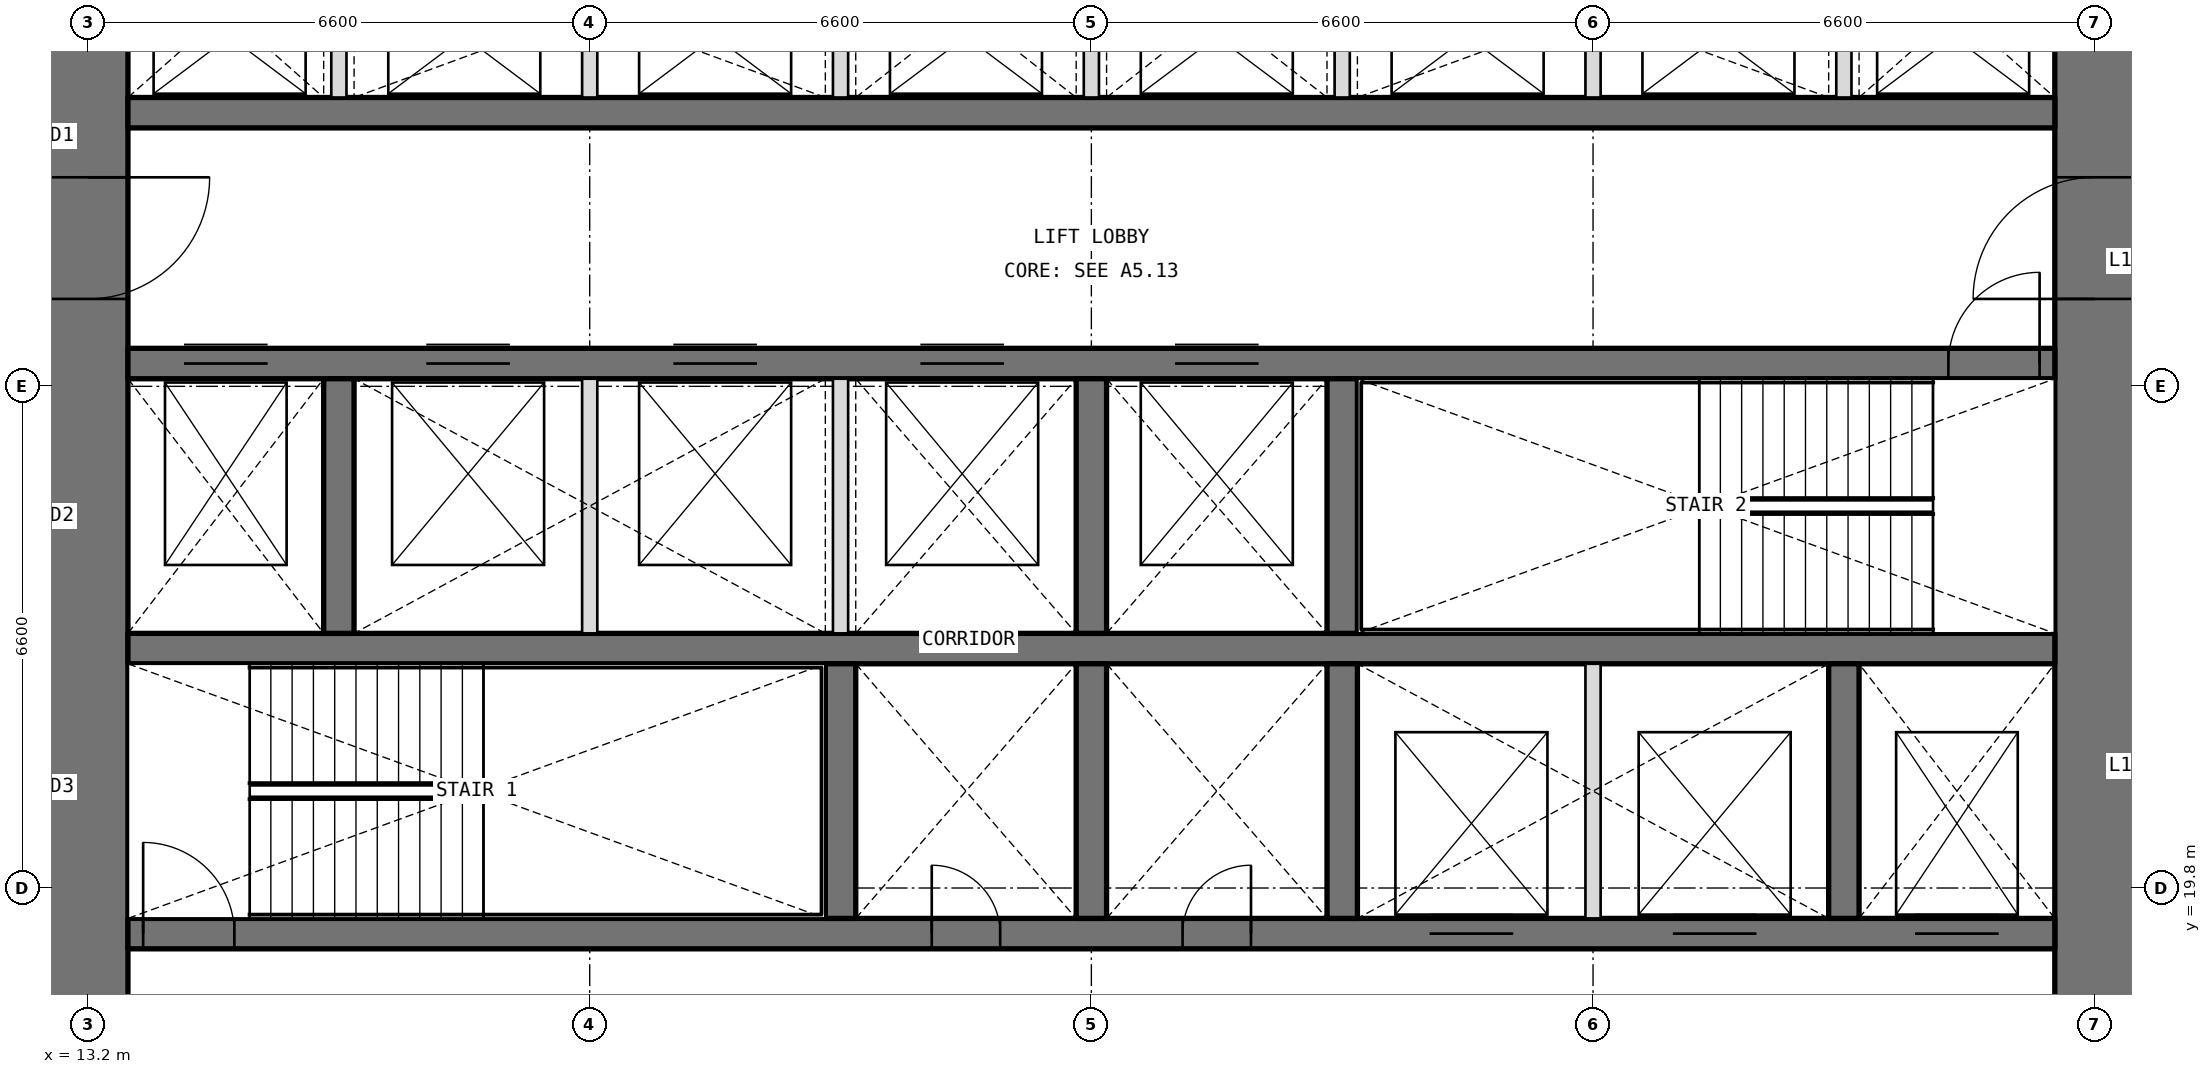
"""IFC4 building model, lengths in metres.
Left out: names, types, materials, properties, quantities, classifications, styles, units other than length and angle.
Written with IfcOpenShell. Run it as: python <this file> out.ifc"""

import sys

from ifc_helpers import new_model, si_unit, direction, frame, frame_2d, origin, place, context, subcontext, project, spatial, rectangle, extrude, element, fill, save


model = new_model("IFC4")
c1 = context("Model", 3, precision=1e-05, world=origin(), true_north=direction((0.0, 1.0)))
c2 = subcontext(c1, "Body", "Model", "MODEL_VIEW")
j1 = project(units=[si_unit("LENGTHUNIT", "METRE"), si_unit("PLANEANGLEUNIT", "RADIAN")], contexts=[c1])
p1 = place(None, origin())
s1 = spatial("IfcSite", under=j1, at=p1, CompositionType="ELEMENT")
p2 = place(p1, origin())
s2 = spatial("IfcBuilding", under=s1, at=p2, CompositionType="ELEMENT")
p3 = place(p2, frame((0.0, 0.0, 50.7)))
s3 = spatial("IfcBuildingStorey", under=s2, at=p3, CompositionType="ELEMENT", Elevation=50.7)
p4 = place(p3, frame((39.6, 13.725, 0.0), z_axis=(0.0, 0.0, 1.0), x_axis=(0.0, 1.0, 0.0)))
e1 = element("IfcWall", 1, at=p4, inside=s3, PredefinedType="SHEAR", context=c2, shape_type="SweptSolid", body=[
    extrude(rectangle(XDim=18.75, YDim=1.05, at=frame_2d((9.375, 0.0))), origin(), (0.0, 0.0, 1.0), 4.2),
])
p5 = place(p4, frame((3.025, 0.0, 0.0)))
e2 = element("IfcOpeningElement", 2, at=p5, cuts=e1, PredefinedType="OPENING", context=c2, shape_type="SweptSolid", body=[
    extrude(rectangle(XDim=1.6, YDim=2.1, at=frame_2d((0.8, 1.05))), frame((0.0, 0.535, 0.0), z_axis=(0.0, -1.0, 0.0), x_axis=(1.0, 0.0, 0.0)), (0.0, 0.0, 1.0), 1.07),
])
p6 = place(p4, frame((13.825, 0.0, 0.0)))
e3 = element("IfcOpeningElement", 3, at=p6, cuts=e1, PredefinedType="OPENING", context=c2, shape_type="SweptSolid", body=[
    extrude(rectangle(XDim=1.6, YDim=2.1, at=frame_2d((0.8, 1.05))), frame((0.0, 0.535, 0.0), z_axis=(0.0, -1.0, 0.0), x_axis=(1.0, 0.0, 0.0)), (0.0, 0.0, 1.0), 1.07),
])
p7 = place(p3, frame((13.2, 32.475, 0.0), z_axis=(0.0, 0.0, 1.0), x_axis=(0.0, -1.0, 0.0)))
e4 = element("IfcWall", 4, at=p7, inside=s3, PredefinedType="SHEAR", context=c2, shape_type="SweptSolid", body=[
    extrude(rectangle(XDim=18.75, YDim=1.05, at=frame_2d((9.375, 0.0))), origin(), (0.0, 0.0, 1.0), 4.2),
])
p8 = place(p7, frame((14.125, 0.0, 0.0)))
e5 = element("IfcOpeningElement", 5, at=p8, cuts=e4, PredefinedType="OPENING", context=c2, shape_type="SweptSolid", body=[
    extrude(rectangle(XDim=1.6, YDim=2.1, at=frame_2d((0.8, 1.05))), frame((0.0, 0.535, 0.0), z_axis=(0.0, -1.0, 0.0), x_axis=(1.0, 0.0, 0.0)), (0.0, 0.0, 1.0), 1.07),
])
p9 = place(p7, frame((3.325, 0.0, 0.0)))
e6 = element("IfcOpeningElement", 6, at=p9, cuts=e4, PredefinedType="OPENING", context=c2, shape_type="SweptSolid", body=[
    extrude(rectangle(XDim=1.6, YDim=2.1, at=frame_2d((0.8, 1.05))), frame((0.0, 0.535, 0.0), z_axis=(0.0, -1.0, 0.0), x_axis=(1.0, 0.0, 0.0)), (0.0, 0.0, 1.0), 1.07),
])
p10 = place(p3, frame((13.725, 19.2, 0.0), z_axis=(0.0, 0.0, 1.0), x_axis=(1.0, 0.0, 0.0)))
e7 = element("IfcWall", 7, at=p10, inside=s3, PredefinedType="SHEAR", context=c2, shape_type="SweptSolid", body=[
    extrude(rectangle(XDim=25.35, YDim=0.4, at=frame_2d((12.675, 0.0))), origin(), (0.0, 0.0, 1.0), 4.2),
])
p11 = place(p10, frame((10.575, 0.0, 0.0)))
e8 = element("IfcOpeningElement", 8, at=p11, cuts=e7, PredefinedType="OPENING", context=c2, shape_type="SweptSolid", body=[
    extrude(rectangle(XDim=0.9, YDim=2.1, at=frame_2d((0.45, 1.05))), frame((0.0, 0.21, 0.0), z_axis=(0.0, -1.0, 0.0), x_axis=(1.0, 0.0, 0.0)), (0.0, 0.0, 1.0), 0.42),
])
p12 = place(p10, frame((13.875, 0.0, 0.0)))
e9 = element("IfcOpeningElement", 9, at=p12, cuts=e7, PredefinedType="OPENING", context=c2, shape_type="SweptSolid", body=[
    extrude(rectangle(XDim=0.9, YDim=2.1, at=frame_2d((0.45, 1.05))), frame((0.0, 0.21, 0.0), z_axis=(0.0, -1.0, 0.0), x_axis=(1.0, 0.0, 0.0)), (0.0, 0.0, 1.0), 0.42),
])
p13 = place(p10, frame((0.2, 0.0, 0.0)))
e10 = element("IfcOpeningElement", 10, at=p13, cuts=e7, PredefinedType="OPENING", context=c2, shape_type="SweptSolid", body=[
    extrude(rectangle(XDim=1.2, YDim=2.1, at=frame_2d((0.6, 1.05))), frame((0.0, 0.21, 0.0), z_axis=(0.0, -1.0, 0.0), x_axis=(1.0, 0.0, 0.0)), (0.0, 0.0, 1.0), 0.42),
])
p14 = place(p10, frame((23.512, 0.0, 0.0)))
e11 = element("IfcOpeningElement", 11, at=p14, cuts=e7, PredefinedType="OPENING", context=c2, shape_type="SweptSolid", body=[
    extrude(rectangle(XDim=1.1, YDim=2.1, at=frame_2d((0.55, 1.05))), frame((0.0, 0.21, 0.0), z_axis=(0.0, -1.0, 0.0), x_axis=(1.0, 0.0, 0.0)), (0.0, 0.0, 1.0), 0.42),
])
p15 = place(p10, frame((17.125, 0.0, 0.0)))
e12 = element("IfcOpeningElement", 12, at=p15, cuts=e7, PredefinedType="OPENING", context=c2, shape_type="SweptSolid", body=[
    extrude(rectangle(XDim=1.1, YDim=2.1, at=frame_2d((0.55, 1.05))), frame((0.0, 0.21, 0.0), z_axis=(0.0, -1.0, 0.0), x_axis=(1.0, 0.0, 0.0)), (0.0, 0.0, 1.0), 0.42),
])
p16 = place(p10, frame((20.325, 0.0, 0.0)))
e13 = element("IfcOpeningElement", 13, at=p16, cuts=e7, PredefinedType="OPENING", context=c2, shape_type="SweptSolid", body=[
    extrude(rectangle(XDim=1.1, YDim=2.1, at=frame_2d((0.55, 1.05))), frame((0.0, 0.21, 0.0), z_axis=(0.0, -1.0, 0.0), x_axis=(1.0, 0.0, 0.0)), (0.0, 0.0, 1.0), 0.42),
])
p17 = place(p3, frame((13.725, 22.95, 0.0), z_axis=(0.0, 0.0, 1.0), x_axis=(1.0, 0.0, 0.0)))
e14 = element("IfcWall", 14, at=p17, inside=s3, PredefinedType="SHEAR", context=c2, shape_type="SweptSolid", body=[
    extrude(rectangle(XDim=25.35, YDim=0.4, at=frame_2d((12.675, 0.0))), origin(), (0.0, 0.0, 1.0), 4.2),
])
p18 = place(p3, frame((13.725, 26.7, 0.0), z_axis=(0.0, 0.0, 1.0), x_axis=(1.0, 0.0, 0.0)))
e15 = element("IfcWall", 15, at=p18, inside=s3, PredefinedType="SHEAR", context=c2, shape_type="SweptSolid", body=[
    extrude(rectangle(XDim=25.35, YDim=0.4, at=frame_2d((12.675, 0.0))), origin(), (0.0, 0.0, 1.0), 4.2),
])
p19 = place(p18, frame((23.95, 0.0, 0.0)))
e16 = element("IfcOpeningElement", 16, at=p19, cuts=e15, PredefinedType="OPENING", context=c2, shape_type="SweptSolid", body=[
    extrude(rectangle(XDim=1.2, YDim=2.1, at=frame_2d((0.6, 1.05))), frame((0.0, 0.21, 0.0), z_axis=(0.0, -1.0, 0.0), x_axis=(1.0, 0.0, 0.0)), (0.0, 0.0, 1.0), 0.42),
])
p20 = place(p18, frame((0.738, 0.0, 0.0)))
e17 = element("IfcOpeningElement", 17, at=p20, cuts=e15, PredefinedType="OPENING", context=c2, shape_type="SweptSolid", body=[
    extrude(rectangle(XDim=1.1, YDim=2.1, at=frame_2d((0.55, 1.05))), frame((0.0, 0.21, 0.0), z_axis=(0.0, -1.0, 0.0), x_axis=(1.0, 0.0, 0.0)), (0.0, 0.0, 1.0), 0.42),
])
p21 = place(p18, frame((3.925, 0.0, 0.0)))
e18 = element("IfcOpeningElement", 18, at=p21, cuts=e15, PredefinedType="OPENING", context=c2, shape_type="SweptSolid", body=[
    extrude(rectangle(XDim=1.1, YDim=2.1, at=frame_2d((0.55, 1.05))), frame((0.0, 0.21, 0.0), z_axis=(0.0, -1.0, 0.0), x_axis=(1.0, 0.0, 0.0)), (0.0, 0.0, 1.0), 0.42),
])
p22 = place(p18, frame((7.175, 0.0, 0.0)))
e19 = element("IfcOpeningElement", 19, at=p22, cuts=e15, PredefinedType="OPENING", context=c2, shape_type="SweptSolid", body=[
    extrude(rectangle(XDim=1.1, YDim=2.1, at=frame_2d((0.55, 1.05))), frame((0.0, 0.21, 0.0), z_axis=(0.0, -1.0, 0.0), x_axis=(1.0, 0.0, 0.0)), (0.0, 0.0, 1.0), 0.42),
])
p23 = place(p18, frame((10.425, 0.0, 0.0)))
e20 = element("IfcOpeningElement", 20, at=p23, cuts=e15, PredefinedType="OPENING", context=c2, shape_type="SweptSolid", body=[
    extrude(rectangle(XDim=1.1, YDim=2.1, at=frame_2d((0.55, 1.05))), frame((0.0, 0.21, 0.0), z_axis=(0.0, -1.0, 0.0), x_axis=(1.0, 0.0, 0.0)), (0.0, 0.0, 1.0), 0.42),
])
p24 = place(p18, frame((13.775, 0.0, 0.0)))
e21 = element("IfcOpeningElement", 21, at=p24, cuts=e15, PredefinedType="OPENING", context=c2, shape_type="SweptSolid", body=[
    extrude(rectangle(XDim=1.1, YDim=2.1, at=frame_2d((0.55, 1.05))), frame((0.0, 0.21, 0.0), z_axis=(0.0, -1.0, 0.0), x_axis=(1.0, 0.0, 0.0)), (0.0, 0.0, 1.0), 0.42),
])
p25 = place(p3, frame((13.725, 30.0, 0.0), z_axis=(0.0, 0.0, 1.0), x_axis=(1.0, 0.0, 0.0)))
e22 = element("IfcWall", 22, at=p25, inside=s3, PredefinedType="SHEAR", context=c2, shape_type="SweptSolid", body=[
    extrude(rectangle(XDim=25.35, YDim=0.4, at=frame_2d((12.675, 0.0))), origin(), (0.0, 0.0, 1.0), 4.2),
])
for number, where, z_axis, x_axis in (
    (23, (23.1, 19.4, 0.0), (0.0, 0.0, 1.0), (0.0, 1.0, 0.0)),
    (24, (26.4, 19.4, 0.0), (0.0, 0.0, 1.0), (0.0, 1.0, 0.0)),
    (25, (29.7, 19.4, 0.0), (0.0, 0.0, 1.0), (0.0, 1.0, 0.0)),
    (26, (36.3, 19.4, 0.0), (0.0, 0.0, 1.0), (0.0, 1.0, 0.0)),
    (27, (16.5, 23.15, 0.0), (0.0, 0.0, 1.0), (0.0, 1.0, 0.0)),
    (28, (26.4, 23.15, 0.0), (0.0, 0.0, 1.0), (0.0, 1.0, 0.0)),
    (29, (29.7, 23.15, 0.0), (0.0, 0.0, 1.0), (0.0, 1.0, 0.0)),
):
    element("IfcWall", number, at=place(p3, frame(where, z_axis=z_axis, x_axis=x_axis)), inside=s3, PredefinedType="SHEAR", context=c2, shape_type="SweptSolid", body=[
        extrude(rectangle(XDim=3.35, YDim=0.4, at=frame_2d((1.675, 0.0))), origin(), (0.0, 0.0, 1.0), 4.2),
    ])
for number, where, z_axis, x_axis in (
    (30, (16.5, 30.2, 0.0), (0.0, 0.0, 1.0), (0.0, 1.0, 0.0)),
    (31, (19.8, 30.2, 0.0), (0.0, 0.0, 1.0), (0.0, 1.0, 0.0)),
    (32, (23.1, 30.2, 0.0), (0.0, 0.0, 1.0), (0.0, 1.0, 0.0)),
    (33, (26.4, 30.2, 0.0), (0.0, 0.0, 1.0), (0.0, 1.0, 0.0)),
    (34, (29.7, 30.2, 0.0), (0.0, 0.0, 1.0), (0.0, 1.0, 0.0)),
    (35, (33.0, 30.2, 0.0), (0.0, 0.0, 1.0), (0.0, 1.0, 0.0)),
    (36, (36.3, 30.2, 0.0), (0.0, 0.0, 1.0), (0.0, 1.0, 0.0)),
):
    element("IfcWall", number, at=place(p3, frame(where, z_axis=z_axis, x_axis=x_axis)), inside=s3, PredefinedType="PARTITIONING", context=c2, shape_type="SweptSolid", body=[
        extrude(rectangle(XDim=2.275, YDim=0.2, at=frame_2d((1.138, 0.0))), origin(), (0.0, 0.0, 1.0), 4.2),
    ])
for number, where, z_axis, x_axis in (
    (37, (33.0, 19.4, 0.0), (0.0, 0.0, 1.0), (0.0, 1.0, 0.0)),
    (38, (19.8, 23.15, 0.0), (0.0, 0.0, 1.0), (0.0, 1.0, 0.0)),
    (39, (23.1, 23.15, 0.0), (0.0, 0.0, 1.0), (0.0, 1.0, 0.0)),
):
    element("IfcWall", number, at=place(p3, frame(where, z_axis=z_axis, x_axis=x_axis)), inside=s3, PredefinedType="PARTITIONING", context=c2, shape_type="SweptSolid", body=[
        extrude(rectangle(XDim=3.35, YDim=0.2, at=frame_2d((1.675, 0.0))), origin(), (0.0, 0.0, 1.0), 4.2),
    ])
p26 = place(p11, origin())
e40 = element("IfcDoor", 40, at=p26, inside=s3, OperationType="SINGLE_SWING_LEFT", PredefinedType="DOOR", context=c2, shape_type="SweptSolid", body=[
    extrude(rectangle(XDim=0.9, YDim=2.1, at=frame_2d((0.45, 1.05))), frame((0.0, 0.025, 0.0), z_axis=(0.0, -1.0, 0.0), x_axis=(1.0, 0.0, 0.0)), (0.0, 0.0, 1.0), 0.05),
])
fill(e8, e40)
p27 = place(p12, origin())
e41 = element("IfcDoor", 41, at=p27, inside=s3, OperationType="SINGLE_SWING_RIGHT", PredefinedType="DOOR", context=c2, shape_type="SweptSolid", body=[
    extrude(rectangle(XDim=0.9, YDim=2.1, at=frame_2d((0.45, 1.05))), frame((0.0, 0.025, 0.0), z_axis=(0.0, -1.0, 0.0), x_axis=(1.0, 0.0, 0.0)), (0.0, 0.0, 1.0), 0.05),
])
fill(e9, e41)
p28 = place(p13, origin())
e42 = element("IfcDoor", 42, at=p28, inside=s3, OperationType="SINGLE_SWING_LEFT", PredefinedType="DOOR", context=c2, shape_type="SweptSolid", body=[
    extrude(rectangle(XDim=1.2, YDim=2.1, at=frame_2d((0.6, 1.05))), frame((0.0, 0.025, 0.0), z_axis=(0.0, -1.0, 0.0), x_axis=(1.0, 0.0, 0.0)), (0.0, 0.0, 1.0), 0.05),
])
fill(e10, e42)
p29 = place(p19, origin())
e43 = element("IfcDoor", 43, at=p29, inside=s3, OperationType="SINGLE_SWING_RIGHT", PredefinedType="DOOR", context=c2, shape_type="SweptSolid", body=[
    extrude(rectangle(XDim=1.2, YDim=2.1, at=frame_2d((0.6, 1.05))), frame((0.0, 0.025, 0.0), z_axis=(0.0, -1.0, 0.0), x_axis=(1.0, 0.0, 0.0)), (0.0, 0.0, 1.0), 0.05),
])
fill(e16, e43)
p30 = place(p9, origin())
e44 = element("IfcDoor", 44, at=p30, inside=s3, OperationType="DOUBLE_DOOR_DOUBLE_SWING", PredefinedType="DOOR", context=c2, shape_type="SweptSolid", body=[
    extrude(rectangle(XDim=1.6, YDim=2.1, at=frame_2d((0.8, 1.05))), frame((0.0, 0.025, 0.0), z_axis=(0.0, -1.0, 0.0), x_axis=(1.0, 0.0, 0.0)), (0.0, 0.0, 1.0), 0.05),
])
fill(e6, e44)
p31 = place(p6, origin())
e45 = element("IfcDoor", 45, at=p31, inside=s3, OperationType="DOUBLE_DOOR_DOUBLE_SWING", PredefinedType="DOOR", context=c2, shape_type="SweptSolid", body=[
    extrude(rectangle(XDim=1.6, YDim=2.1, at=frame_2d((0.8, 1.05))), frame((0.0, 0.025, 0.0), z_axis=(0.0, -1.0, 0.0), x_axis=(1.0, 0.0, 0.0)), (0.0, 0.0, 1.0), 0.05),
])
fill(e3, e45)
p32 = place(p20, origin())
e46 = element("IfcDoor", 46, at=p32, inside=s3, OperationType="DOUBLE_DOOR_SLIDING", PredefinedType="DOOR", context=c2, shape_type="SweptSolid", body=[
    extrude(rectangle(XDim=1.1, YDim=2.1, at=frame_2d((0.55, 1.05))), frame((0.0, 0.025, 0.0), z_axis=(0.0, -1.0, 0.0), x_axis=(1.0, 0.0, 0.0)), (0.0, 0.0, 1.0), 0.05),
])
fill(e17, e46)
p33 = place(p14, origin())
e47 = element("IfcDoor", 47, at=p33, inside=s3, OperationType="DOUBLE_DOOR_SLIDING", PredefinedType="DOOR", context=c2, shape_type="SweptSolid", body=[
    extrude(rectangle(XDim=1.1, YDim=2.1, at=frame_2d((0.55, 1.05))), frame((0.0, 0.025, 0.0), z_axis=(0.0, -1.0, 0.0), x_axis=(1.0, 0.0, 0.0)), (0.0, 0.0, 1.0), 0.05),
])
fill(e11, e47)
p34 = place(p15, origin())
e48 = element("IfcDoor", 48, at=p34, inside=s3, OperationType="DOUBLE_DOOR_SLIDING", PredefinedType="DOOR", context=c2, shape_type="SweptSolid", body=[
    extrude(rectangle(XDim=1.1, YDim=2.1, at=frame_2d((0.55, 1.05))), frame((0.0, 0.025, 0.0), z_axis=(0.0, -1.0, 0.0), x_axis=(1.0, 0.0, 0.0)), (0.0, 0.0, 1.0), 0.05),
])
fill(e12, e48)
p35 = place(p16, origin())
e49 = element("IfcDoor", 49, at=p35, inside=s3, OperationType="DOUBLE_DOOR_SLIDING", PredefinedType="DOOR", context=c2, shape_type="SweptSolid", body=[
    extrude(rectangle(XDim=1.1, YDim=2.1, at=frame_2d((0.55, 1.05))), frame((0.0, 0.025, 0.0), z_axis=(0.0, -1.0, 0.0), x_axis=(1.0, 0.0, 0.0)), (0.0, 0.0, 1.0), 0.05),
])
fill(e13, e49)
p36 = place(p21, origin())
e50 = element("IfcDoor", 50, at=p36, inside=s3, OperationType="DOUBLE_DOOR_SLIDING", PredefinedType="DOOR", context=c2, shape_type="SweptSolid", body=[
    extrude(rectangle(XDim=1.1, YDim=2.1, at=frame_2d((0.55, 1.05))), frame((0.0, 0.025, 0.0), z_axis=(0.0, -1.0, 0.0), x_axis=(1.0, 0.0, 0.0)), (0.0, 0.0, 1.0), 0.05),
])
fill(e18, e50)
p37 = place(p22, origin())
e51 = element("IfcDoor", 51, at=p37, inside=s3, OperationType="DOUBLE_DOOR_SLIDING", PredefinedType="DOOR", context=c2, shape_type="SweptSolid", body=[
    extrude(rectangle(XDim=1.1, YDim=2.1, at=frame_2d((0.55, 1.05))), frame((0.0, 0.025, 0.0), z_axis=(0.0, -1.0, 0.0), x_axis=(1.0, 0.0, 0.0)), (0.0, 0.0, 1.0), 0.05),
])
fill(e19, e51)
p38 = place(p23, origin())
e52 = element("IfcDoor", 52, at=p38, inside=s3, OperationType="DOUBLE_DOOR_SLIDING", PredefinedType="DOOR", context=c2, shape_type="SweptSolid", body=[
    extrude(rectangle(XDim=1.1, YDim=2.1, at=frame_2d((0.55, 1.05))), frame((0.0, 0.025, 0.0), z_axis=(0.0, -1.0, 0.0), x_axis=(1.0, 0.0, 0.0)), (0.0, 0.0, 1.0), 0.05),
])
fill(e20, e52)
p39 = place(p24, origin())
e53 = element("IfcDoor", 53, at=p39, inside=s3, OperationType="DOUBLE_DOOR_SLIDING", PredefinedType="DOOR", context=c2, shape_type="SweptSolid", body=[
    extrude(rectangle(XDim=1.1, YDim=2.1, at=frame_2d((0.55, 1.05))), frame((0.0, 0.025, 0.0), z_axis=(0.0, -1.0, 0.0), x_axis=(1.0, 0.0, 0.0)), (0.0, 0.0, 1.0), 0.05),
])
fill(e21, e53)
save(model, sys.argv[1])
